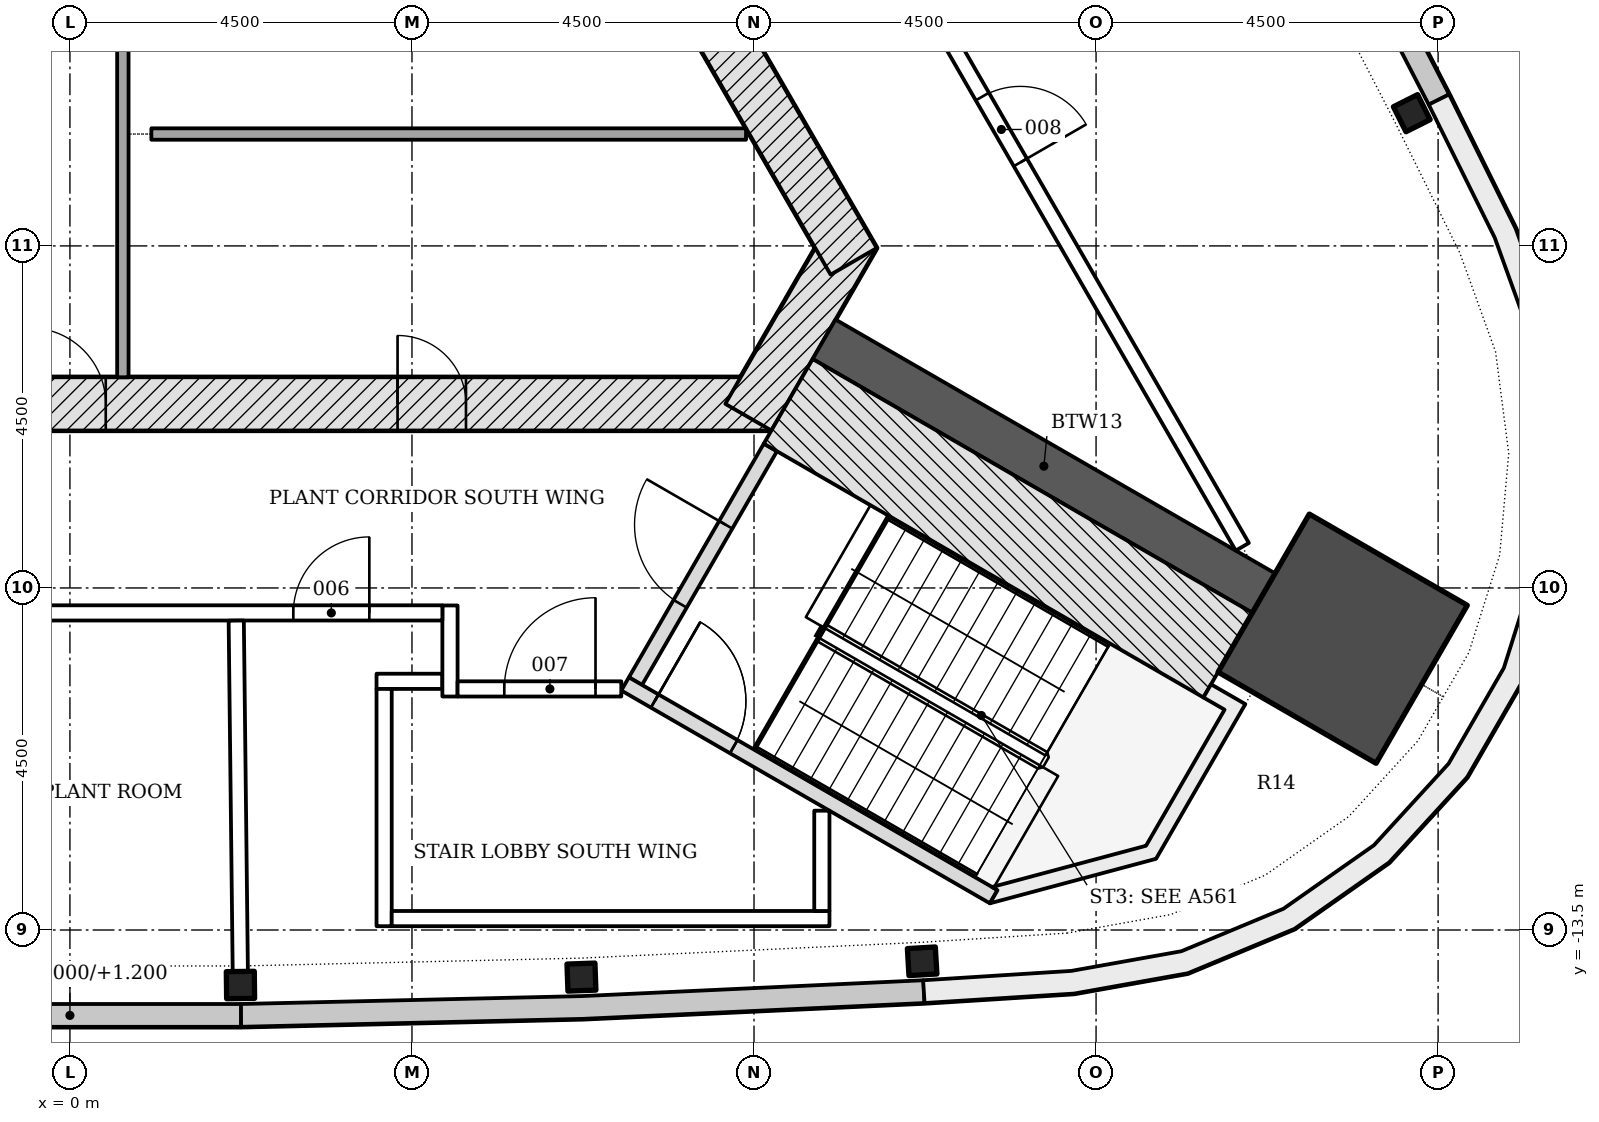
"""IFC4 building model, lengths in metres.
Left out: names, types, materials, properties, quantities, classifications, styles, units other than length and angle.
Written with IfcOpenShell. Run it as: python <this file> out.ifc"""

import sys

from ifc_helpers import new_model, si_unit, direction, frame, frame_2d, origin, origin_2d, place, context, subcontext, project, spatial, polyline, rectangle, i_section, outline, extrude, element, fill, save


model = new_model("IFC4")
c1 = context("Model", 3, precision=1e-05, world=origin(), true_north=direction((0.0, 1.0)))
c2 = subcontext(c1, "Body", "Model", "MODEL_VIEW")
j1 = project(units=[si_unit("LENGTHUNIT", "METRE"), si_unit("PLANEANGLEUNIT", "RADIAN")], contexts=[c1])
p1 = place(None, origin())
s1 = spatial("IfcSite", under=j1, at=p1, CompositionType="ELEMENT")
p2 = place(p1, origin())
s2 = spatial("IfcBuilding", under=s1, at=p2, CompositionType="ELEMENT")
p3 = place(p2, frame((0.0, 0.0, 302.1)))
s3 = spatial("IfcBuildingStorey", under=s2, at=p3, CompositionType="ELEMENT", Elevation=302.1)
p4 = place(p3, frame((-9.229, -6.578, -0.25), z_axis=(0.0, 0.0, 1.0), x_axis=(1.0, 0.0, 0.0)))
e1 = element("IfcWall", 1, at=p4, inside=s3, PredefinedType="SHEAR", context=c2, shape_type="SweptSolid", body=[
    extrude(rectangle(XDim=18.458, YDim=0.7, at=frame_2d((9.229, 0.0))), origin(), (0.0, 0.0, 1.0), 4.5),
])
p5 = place(p4, frame((8.7, 0.0, 0.25)))
e2 = element("IfcOpeningElement", 2, at=p5, cuts=e1, PredefinedType="OPENING", context=c2, shape_type="SweptSolid", body=[
    extrude(rectangle(XDim=1.0, YDim=2.1, at=frame_2d((0.5, 1.05))), frame((0.0, 0.36, 0.0), z_axis=(0.0, -1.0, 0.0), x_axis=(1.0, 0.0, 0.0)), (0.0, 0.0, 1.0), 0.72),
])
p6 = place(p4, frame((3.99, 0.0, 0.25)))
e3 = element("IfcOpeningElement", 3, at=p6, cuts=e1, PredefinedType="OPENING", context=c2, shape_type="SweptSolid", body=[
    extrude(rectangle(XDim=0.9, YDim=2.1, at=frame_2d((0.45, 1.05))), frame((0.0, 0.36, 0.0), z_axis=(0.0, -1.0, 0.0), x_axis=(1.0, 0.0, 0.0)), (0.0, 0.0, 1.0), 0.72),
])
p7 = place(p4, frame((13.539, 0.0, 0.25)))
e4 = element("IfcOpeningElement", 4, at=p7, cuts=e1, PredefinedType="OPENING", context=c2, shape_type="SweptSolid", body=[
    extrude(rectangle(XDim=0.9, YDim=2.1, at=frame_2d((0.45, 1.05))), frame((0.0, 0.36, 0.0), z_axis=(0.0, -1.0, 0.0), x_axis=(1.0, 0.0, 0.0)), (0.0, 0.0, 1.0), 0.72),
])
p8 = place(p3, frame((8.926, -6.753, -0.25), z_axis=(0.0, 0.0, 1.0), x_axis=(0.500042739161, 0.866000726912, 0.0)))
e5 = element("IfcWall", 5, at=p8, inside=s3, PredefinedType="SHEAR", context=c2, shape_type="SweptSolid", body=[
    extrude(rectangle(XDim=2.771, YDim=0.7, at=frame_2d((1.386, 0.0))), origin(), (0.0, 0.0, 1.0), 4.5),
])
p9 = place(p3, frame((10.311, -4.703, -0.25), z_axis=(0.0, 0.0, 1.0), x_axis=(-0.500001446645, 0.866024568562, 0.0)))
e6 = element("IfcWall", 6, at=p9, inside=s3, PredefinedType="SHEAR", context=c2, shape_type="SweptSolid", body=[
    extrude(rectangle(XDim=18.458, YDim=0.7, at=frame_2d((9.229, 0.0))), origin(), (0.0, 0.0, 1.0), 4.5),
])
p10 = place(p3, frame((9.922, -5.728, -0.25), z_axis=(0.0, 0.0, 1.0), x_axis=(0.866032176823, -0.499988268569, 0.0)))
e7 = element("IfcWall", 7, at=p10, inside=s3, PredefinedType="SHEAR", context=c2, shape_type="SweptSolid", body=[
    extrude(rectangle(XDim=6.678, YDim=0.6, at=frame_2d((3.339, 0.0))), origin(), (0.0, 0.0, 1.0), 4.5),
])
p11 = place(p3, frame((16.745, -9.667, -0.25), z_axis=(0.0, 0.0, 1.0), x_axis=(0.866025403784, -0.5, 0.0)))
e8 = element("IfcColumn", 8, at=p11, inside=s3, PredefinedType="COLUMN", context=c2, shape_type="SweptSolid", body=[
    extrude(rectangle(XDim=2.4, YDim=2.4, at=origin_2d()), origin(), (0.0, 0.0, 1.0), 4.5),
])
for number, where, z_axis, x_axis in (
    (9, (2.244, -14.224, -0.25), (0.0, 0.0, 1.0), (1.0, 0.012, 0.0)),
    (10, (6.729, -14.119, -0.25), (0.0, 0.0, 1.0), (0.999, 0.035, 0.0)),
    (11, (11.212, -13.911, -0.25), (0.0, 0.0, 1.0), (0.998, 0.058, 0.0)),
    (12, (17.654, -2.754, -0.25), (0.0, 0.0, 1.0), (-0.449, 0.894, 0.0)),
):
    element("IfcColumn", number, at=place(p3, frame(where, z_axis=z_axis, x_axis=x_axis)), inside=s3, PredefinedType="COLUMN", context=c2, shape_type="SweptSolid", body=[
        extrude(i_section(OverallWidth=0.368, OverallDepth=0.356, WebThickness=0.011, FlangeThickness=0.018, FilletRadius=0.015, at=origin_2d()), origin(), (0.0, 0.0, 1.0), 4.5),
    ])
p12 = place(p3, origin())
e13 = element("IfcWall", 13, at=p12, inside=s3, PredefinedType="NOTDEFINED", context=c2, shape_type="SweptSolid", body=[
    extrude(outline(polyline([(2.25, -14.773), (6.749, -14.669), (11.244, -14.46), (11.23, -14.161), (6.738, -14.369), (2.243, -14.474), (2.25, -14.773)])), origin(), (0.0, 0.0, 1.0), 4.25),
])
p13 = place(p3, origin())
e14 = element("IfcWall", 14, at=p13, inside=s3, PredefinedType="NOTDEFINED", context=c2, shape_type="SweptSolid", body=[
    extrude(outline(polyline([(-2.25, -14.773), (2.25, -14.773), (2.25, -14.473), (-2.25, -14.473), (-2.25, -14.773)])), origin(), (0.0, 0.0, 1.0), 1.2),
])
p14 = place(p3, origin())
e15 = element("IfcWall", 15, at=p14, inside=s3, PredefinedType="NOTDEFINED", context=c2, shape_type="SweptSolid", body=[
    extrude(outline(polyline([(18.145, -2.507), (16.078, 1.49), (13.919, 5.438), (13.656, 5.294), (15.813, 1.349), (17.878, -2.645), (18.145, -2.507)])), origin(), (0.0, 0.0, 1.0), 4.25),
])
p15 = place(p3, origin())
e16 = element("IfcWall", 16, at=p15, inside=s3, PredefinedType="NOTDEFINED", context=c2, shape_type="SweptSolid", body=[
    extrude(outline(polyline([(11.244, -14.46), (13.211, -14.336), (14.708, -14.069), (16.111, -13.485), (17.355, -12.611), (18.381, -11.49), (19.141, -10.174), (19.599, -8.724), (19.733, -7.21), (19.538, -5.703), (19.021, -4.273), (18.145, -2.507), (17.876, -2.64), (18.745, -4.391), (19.244, -5.774), (19.432, -7.216), (19.303, -8.665), (18.865, -10.052), (18.138, -11.312), (17.156, -12.385), (15.965, -13.22), (14.623, -13.779), (13.176, -14.038), (11.225, -14.161), (11.244, -14.46)])), origin(), (0.0, 0.0, 1.0), 4.25),
])
p16 = place(p3, frame((0.696, 5.197, 0.0), z_axis=(0.0, 0.0, 1.0), x_axis=(0.0, -1.0, 0.0)))
e17 = element("IfcWall", 17, at=p16, inside=s3, PredefinedType="PARTITIONING", context=c2, shape_type="SweptSolid", body=[
    extrude(rectangle(XDim=11.425, YDim=0.15, at=frame_2d((5.712, 0.0))), origin(), (0.0, 0.0, 1.0), 4.25),
])
p17 = place(p16, frame((3.664, 0.0, 0.0)))
e18 = element("IfcOpeningElement", 18, at=p17, cuts=e17, PredefinedType="OPENING", context=c2, shape_type="SweptSolid", body=[
    extrude(rectangle(XDim=0.9, YDim=2.1, at=frame_2d((0.45, 1.05))), frame((0.0, 0.085, 0.0), z_axis=(0.0, -1.0, 0.0), x_axis=(1.0, 0.0, 0.0)), (0.0, 0.0, 1.0), 0.17),
])
p18 = place(p3, frame((1.071, -3.028, 0.0), z_axis=(0.0, 0.0, 1.0), x_axis=(1.0, 0.0, 0.0)))
e19 = element("IfcWall", 19, at=p18, inside=s3, PredefinedType="PARTITIONING", context=c2, shape_type="SweptSolid", body=[
    extrude(rectangle(XDim=7.824, YDim=0.15, at=frame_2d((3.912, 0.0))), origin(), (0.0, 0.0, 1.0), 4.25),
])
p19 = place(p3, frame((7.44, -10.226, -0.25), z_axis=(0.0, 0.0, 1.0), x_axis=(0.500022077904, 0.866012656725, 0.0)))
e20 = element("IfcWall", 20, at=p19, inside=s3, PredefinedType="SHEAR", context=c2, shape_type="SweptSolid", body=[
    extrude(rectangle(XDim=3.55, YDim=0.2, at=frame_2d((1.775, 0.0))), origin(), (0.0, 0.0, 1.0), 4.5),
])
p20 = place(p19, frame((1.175, 0.0, 0.25)))
e21 = element("IfcOpeningElement", 21, at=p20, cuts=e20, PredefinedType="OPENING", context=c2, shape_type="SweptSolid", body=[
    extrude(rectangle(XDim=1.2, YDim=2.1, at=frame_2d((0.6, 1.05))), frame((0.0, 0.11, 0.0), z_axis=(0.0, -1.0, 0.0), x_axis=(1.0, 0.0, 0.0)), (0.0, 0.0, 1.0), 0.22),
])
p21 = place(p3, frame((7.304, -10.262, -0.25), z_axis=(0.0, 0.0, 1.0), x_axis=(0.866026594901, -0.49999793692, 0.0)))
e22 = element("IfcWall", 22, at=p21, inside=s3, PredefinedType="SHEAR", context=c2, shape_type="SweptSolid", body=[
    extrude(rectangle(XDim=5.6, YDim=0.2, at=frame_2d((2.8, 0.0))), origin(), (0.0, 0.0, 1.0), 4.5),
])
p22 = place(p21, frame((0.45, 0.0, 0.25)))
e23 = element("IfcOpeningElement", 23, at=p22, cuts=e22, PredefinedType="OPENING", context=c2, shape_type="SweptSolid", body=[
    extrude(rectangle(XDim=1.2, YDim=2.1, at=frame_2d((0.6, 1.05))), frame((0.0, 0.11, 0.0), z_axis=(0.0, -1.0, 0.0), x_axis=(1.0, 0.0, 0.0)), (0.0, 0.0, 1.0), 0.22),
])
p23 = place(p3, frame((9.45, -6.545, -0.25), z_axis=(0.0, 0.0, 1.0), x_axis=(0.866016347338, -0.500015685897, 0.0)))
e24 = element("IfcWall", 24, at=p23, inside=s3, PredefinedType="SHEAR", context=c2, shape_type="SweptSolid", body=[
    extrude(rectangle(XDim=6.678, YDim=1.286, at=frame_2d((3.339, 0.0))), origin(), (0.0, 0.0, 1.0), 4.5),
])
p24 = place(p3, frame((0.0, 0.0, -0.25)))
e25 = element("IfcWall", 25, at=p24, inside=s3, PredefinedType="SHEAR", context=c2, shape_type="SweptSolid", body=[
    extrude(outline(polyline([(12.104, -13.149), (14.289, -12.563), (15.464, -10.528), (15.013, -10.268), (14.913, -10.441), (15.191, -10.601), (14.157, -12.392), (12.132, -12.934), (12.204, -12.976), (12.204, -12.976), (12.204, -12.976), (12.204, -12.976), (12.204, -12.976), (12.204, -12.976), (12.204, -12.976), (12.204, -12.976), (12.204, -12.976), (12.204, -12.976), (12.204, -12.976), (12.204, -12.976), (12.204, -12.976), (12.204, -12.976), (12.204, -12.976), (12.204, -12.976), (12.204, -12.976), (12.104, -13.149)])), origin(), (0.0, 0.0, 1.0), 4.5),
])
p25 = place(p3, frame((4.034, -10.228, 0.0), z_axis=(0.0, 0.0, 1.0), x_axis=(1.0, 0.0, 0.0)))
e26 = element("IfcWall", 26, at=p25, inside=s3, PredefinedType="PARTITIONING", context=c2, shape_type="SweptSolid", body=[
    extrude(rectangle(XDim=0.866, YDim=0.2, at=frame_2d((0.433, 0.0))), origin(), (0.0, 0.0, 1.0), 4.25),
])
p26 = place(p3, frame((5.0, -10.428, 0.0), z_axis=(0.0, 0.0, 1.0), x_axis=(0.0, 1.0, 0.0)))
e27 = element("IfcWall", 27, at=p26, inside=s3, PredefinedType="PARTITIONING", context=c2, shape_type="SweptSolid", body=[
    extrude(rectangle(XDim=1.198, YDim=0.2, at=frame_2d((0.599, 0.0))), origin(), (0.0, 0.0, 1.0), 4.25),
])
p27 = place(p3, frame((5.1, -10.328, 0.0), z_axis=(0.0, 0.0, 1.0), x_axis=(1.0, 0.0, 0.0)))
e28 = element("IfcWall", 28, at=p27, inside=s3, PredefinedType="PARTITIONING", context=c2, shape_type="SweptSolid", body=[
    extrude(rectangle(XDim=2.154, YDim=0.2, at=frame_2d((1.077, 0.0))), origin(), (0.0, 0.0, 1.0), 3.702),
])
p28 = place(p27, frame((0.615, 0.0, 0.0)))
e29 = element("IfcOpeningElement", 29, at=p28, cuts=e28, PredefinedType="OPENING", context=c2, shape_type="SweptSolid", body=[
    extrude(rectangle(XDim=1.2, YDim=2.1, at=frame_2d((0.6, 1.05))), frame((0.0, 0.11, 0.0), z_axis=(0.0, -1.0, 0.0), x_axis=(1.0, 0.0, 0.0)), (0.0, 0.0, 1.0), 0.22),
])
p29 = place(p3, frame((-15.397, -9.328, 0.0), z_axis=(0.0, 0.0, 1.0), x_axis=(1.0, 0.0, 0.0)))
e30 = element("IfcWall", 30, at=p29, inside=s3, PredefinedType="PARTITIONING", context=c2, shape_type="SweptSolid", body=[
    extrude(rectangle(XDim=20.297, YDim=0.2, at=frame_2d((10.148, 0.0))), origin(), (0.0, 0.0, 1.0), 3.702),
])
p30 = place(p29, frame((8.213, 0.0, 0.0)))
e31 = element("IfcOpeningElement", 31, at=p30, cuts=e30, PredefinedType="OPENING", context=c2, shape_type="SweptSolid", body=[
    extrude(rectangle(XDim=1.0, YDim=2.1, at=frame_2d((0.5, 1.05))), frame((0.0, 0.11, 0.0), z_axis=(0.0, -1.0, 0.0), x_axis=(1.0, 0.0, 0.0)), (0.0, 0.0, 1.0), 0.22),
])
p31 = place(p29, frame((18.336, 0.0, 0.0)))
e32 = element("IfcOpeningElement", 32, at=p31, cuts=e30, PredefinedType="OPENING", context=c2, shape_type="SweptSolid", body=[
    extrude(rectangle(XDim=1.0, YDim=2.1, at=frame_2d((0.5, 1.05))), frame((0.0, 0.11, 0.0), z_axis=(0.0, -1.0, 0.0), x_axis=(1.0, 0.0, 0.0)), (0.0, 0.0, 1.0), 0.22),
])
p32 = place(p3, frame((2.188, -9.429, 0.0), z_axis=(0.0, 0.0, 1.0), x_axis=(0.011564782234, -0.99993312567, 0.0)))
e33 = element("IfcWall", 33, at=p32, inside=s3, PredefinedType="PARTITIONING", context=c2, shape_type="SweptSolid", body=[
    extrude(rectangle(XDim=4.644, YDim=0.2, at=frame_2d((2.322, 0.0))), origin(), (0.0, 0.0, 1.0), 3.702),
])
p33 = place(p3, frame((4.134, -10.328, 0.0), z_axis=(0.0, 0.0, 1.0), x_axis=(0.0, -1.0, 0.0)))
e34 = element("IfcWall", 34, at=p33, inside=s3, PredefinedType="PARTITIONING", context=c2, shape_type="SweptSolid", body=[
    extrude(rectangle(XDim=3.122, YDim=0.2, at=frame_2d((1.561, 0.0))), origin(), (0.0, 0.0, 1.0), 4.25),
])
p34 = place(p3, frame((4.234, -13.35, 0.0), z_axis=(0.0, 0.0, 1.0), x_axis=(1.0, 0.0, 0.0)))
e35 = element("IfcWall", 35, at=p34, inside=s3, PredefinedType="PARTITIONING", context=c2, shape_type="SweptSolid", body=[
    extrude(rectangle(XDim=5.759, YDim=0.2, at=frame_2d((2.879, 0.0))), origin(), (0.0, 0.0, 1.0), 3.702),
])
p35 = place(p3, frame((9.893, -13.25, 0.0), z_axis=(0.0, 0.0, 1.0), x_axis=(0.0, 1.0, 0.0)))
e36 = element("IfcWall", 36, at=p35, inside=s3, PredefinedType="PARTITIONING", context=c2, shape_type="SweptSolid", body=[
    extrude(rectangle(XDim=1.32, YDim=0.2, at=frame_2d((0.66, 0.0))), origin(), (0.0, 0.0, 1.0), 4.25),
])
p36 = place(p3, frame((5.455, 8.808, 0.0), z_axis=(0.0, 0.0, 1.0), x_axis=(0.499996641012, -0.866027343088, 0.0)))
e37 = element("IfcWall", 37, at=p36, inside=s3, PredefinedType="PARTITIONING", context=c2, shape_type="SweptSolid", body=[
    extrude(rectangle(XDim=19.937, YDim=0.2, at=frame_2d((9.969, 0.0))), origin(), (0.0, 0.0, 1.0), 3.702),
])
p37 = place(p36, frame((13.097, 0.0, 0.0)))
e38 = element("IfcOpeningElement", 38, at=p37, cuts=e37, PredefinedType="OPENING", context=c2, shape_type="SweptSolid", body=[
    extrude(rectangle(XDim=1.0, YDim=2.1, at=frame_2d((0.5, 1.05))), frame((0.0, 0.11, 0.0), z_axis=(0.0, -1.0, 0.0), x_axis=(1.0, 0.0, 0.0)), (0.0, 0.0, 1.0), 0.22),
])
p38 = place(p36, frame((4.297, 0.0, 0.0)))
e39 = element("IfcOpeningElement", 39, at=p38, cuts=e37, PredefinedType="OPENING", context=c2, shape_type="SweptSolid", body=[
    extrude(rectangle(XDim=1.0, YDim=2.1, at=frame_2d((0.5, 1.05))), frame((0.0, 0.11, 0.0), z_axis=(0.0, -1.0, 0.0), x_axis=(1.0, 0.0, 0.0)), (0.0, 0.0, 1.0), 0.22),
])
p39 = place(p36, frame((0.963, 0.0, 0.0)))
e40 = element("IfcOpeningElement", 40, at=p39, cuts=e37, PredefinedType="OPENING", context=c2, shape_type="SweptSolid", body=[
    extrude(rectangle(XDim=1.0, YDim=2.1, at=frame_2d((0.5, 1.05))), frame((0.0, 0.11, 0.0), z_axis=(0.0, -1.0, 0.0), x_axis=(1.0, 0.0, 0.0)), (0.0, 0.0, 1.0), 0.22),
])
p40 = place(p5, origin())
e41 = element("IfcDoor", 41, at=p40, inside=s3, OperationType="SINGLE_SWING_LEFT", PredefinedType="DOOR", context=c2, shape_type="SweptSolid", body=[
    extrude(rectangle(XDim=1.0, YDim=2.1, at=frame_2d((0.5, 1.05))), frame((0.0, 0.075, 0.0), z_axis=(0.0, -1.0, 0.0), x_axis=(1.0, 0.0, 0.0)), (0.0, 0.0, 1.0), 0.15),
])
fill(e2, e41)
p41 = place(p7, origin())
e42 = element("IfcDoor", 42, at=p41, inside=s3, OperationType="SINGLE_SWING_LEFT", PredefinedType="DOOR", context=c2, shape_type="SweptSolid", body=[
    extrude(rectangle(XDim=0.9, YDim=2.1, at=frame_2d((0.45, 1.05))), frame((0.0, 0.075, 0.0), z_axis=(0.0, -1.0, 0.0), x_axis=(1.0, 0.0, 0.0)), (0.0, 0.0, 1.0), 0.15),
])
fill(e4, e42)
p42 = place(p20, origin())
e43 = element("IfcDoor", 43, at=p42, inside=s3, OperationType="SINGLE_SWING_RIGHT", PredefinedType="DOOR", context=c2, shape_type="SweptSolid", body=[
    extrude(rectangle(XDim=1.2, YDim=2.1, at=frame_2d((0.6, 1.05))), frame((0.0, 0.025, 0.0), z_axis=(0.0, -1.0, 0.0), x_axis=(1.0, 0.0, 0.0)), (0.0, 0.0, 1.0), 0.05),
])
fill(e21, e43)
p43 = place(p22, origin())
e44 = element("IfcDoor", 44, at=p43, inside=s3, OperationType="SINGLE_SWING_LEFT", PredefinedType="DOOR", context=c2, shape_type="SweptSolid", body=[
    extrude(rectangle(XDim=1.2, YDim=2.1, at=frame_2d((0.6, 1.05))), frame((0.0, 0.025, 0.0), z_axis=(0.0, -1.0, 0.0), x_axis=(1.0, 0.0, 0.0)), (0.0, 0.0, 1.0), 0.05),
])
fill(e23, e44)
p44 = place(p2, frame((0.0, 0.0, 306.6)))
p45 = place(p44, frame((7.304, -10.262, -0.25), z_axis=(0.0, 0.0, 1.0), x_axis=(0.866026594901, -0.49999793692, 0.0)))
p46 = place(p45, frame((0.45, 0.0, 0.25)))
p47 = place(p46, origin())
e45 = element("IfcDoor", 45, at=p47, inside=s3, OperationType="SINGLE_SWING_LEFT", PredefinedType="DOOR", context=c2, shape_type="SweptSolid", body=[
    extrude(rectangle(XDim=1.2, YDim=2.1, at=frame_2d((0.6, 1.05))), frame((0.0, 0.025, 0.0), z_axis=(0.0, -1.0, 0.0), x_axis=(1.0, 0.0, 0.0)), (0.0, 0.0, 1.0), 0.05),
])
p48 = place(p31, origin())
e46 = element("IfcDoor", 46, at=p48, inside=s3, OperationType="SINGLE_SWING_RIGHT", PredefinedType="DOOR", context=c2, shape_type="SweptSolid", body=[
    extrude(rectangle(XDim=1.0, YDim=2.1, at=frame_2d((0.5, 1.05))), frame((0.0, 0.025, 0.0), z_axis=(0.0, -1.0, 0.0), x_axis=(1.0, 0.0, 0.0)), (0.0, 0.0, 1.0), 0.05),
])
fill(e32, e46)
p49 = place(p28, origin())
e47 = element("IfcDoor", 47, at=p49, inside=s3, OperationType="SINGLE_SWING_RIGHT", PredefinedType="DOOR", context=c2, shape_type="SweptSolid", body=[
    extrude(rectangle(XDim=1.2, YDim=2.1, at=frame_2d((0.6, 1.05))), frame((0.0, 0.025, 0.0), z_axis=(0.0, -1.0, 0.0), x_axis=(1.0, 0.0, 0.0)), (0.0, 0.0, 1.0), 0.05),
])
fill(e29, e47)
p50 = place(p37, origin())
e48 = element("IfcDoor", 48, at=p50, inside=s3, OperationType="SINGLE_SWING_RIGHT", PredefinedType="DOOR", context=c2, shape_type="SweptSolid", body=[
    extrude(rectangle(XDim=1.0, YDim=2.1, at=frame_2d((0.5, 1.05))), frame((0.0, 0.025, 0.0), z_axis=(0.0, -1.0, 0.0), x_axis=(1.0, 0.0, 0.0)), (0.0, 0.0, 1.0), 0.05),
])
fill(e38, e48)
save(model, sys.argv[1])
